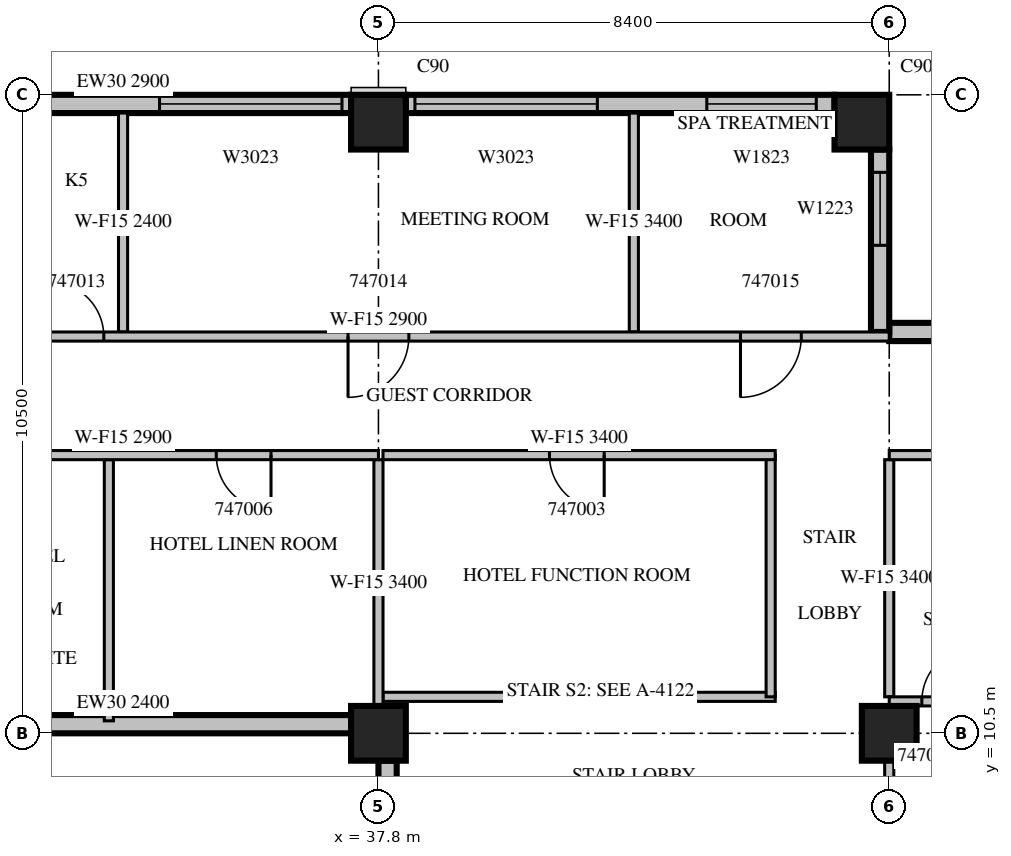
"""IFC4 building model, lengths in metres.
Left out: names, types, materials, properties, quantities, classifications, styles, units other than length and angle.
Written with IfcOpenShell. Run it as: python <this file> out.ifc"""

import sys

from ifc_helpers import new_model, si_unit, direction, frame, frame_2d, origin, origin_2d, place, context, subcontext, project, spatial, rectangle, extrude, source, transform, mapped, element, fill, save


model = new_model("IFC4")
c1 = context("Model", 3, precision=1e-05, world=origin(), true_north=direction((0.0, 1.0)))
c2 = subcontext(c1, "Body", "Model", "MODEL_VIEW")
j1 = project(units=[si_unit("LENGTHUNIT", "METRE"), si_unit("PLANEANGLEUNIT", "RADIAN")], contexts=[c1])
p1 = place(None, origin())
s1 = spatial("IfcSite", under=j1, at=p1, CompositionType="ELEMENT")
p2 = place(p1, origin())
s2 = spatial("IfcBuilding", under=s1, at=p2, CompositionType="ELEMENT")
p3 = place(p2, frame((0.0, 0.0, 212.0)))
s3 = spatial("IfcBuildingStorey", under=s2, at=p3, CompositionType="ELEMENT", Elevation=212.0)
m1 = source(origin(), c2, "Body", "SweptSolid", [
    extrude(rectangle(XDim=0.9, YDim=0.9, at=origin_2d()), origin(), (0.0, 0.0, 1.0), 3.8),
])
for number, where, z_axis, x_axis in (
    (1, (37.8, 10.5, 0.0), (0.0, 0.0, 1.0), (1.0, 0.0, 0.0)),
    (2, (46.2, 10.5, 0.0), (0.0, 0.0, 1.0), (1.0, 0.0, 0.0)),
    (3, (37.8, 20.55, 0.0), (0.0, 0.0, 1.0), (1.0, 0.0, 0.0)),
    (4, (45.75, 20.55, 0.0), (0.0, 0.0, 1.0), (1.0, 0.0, 0.0)),
):
    element("IfcColumn", number, at=place(p3, frame(where, z_axis=z_axis, x_axis=x_axis)), inside=s3, PredefinedType="COLUMN", context=c2, shape_type="MappedRepresentation", body=[
        mapped(m1, transform((0.0, 0.0, 0.0), scale=1.0)),
    ])
m2 = source(origin(), c2, "Body", "SweptSolid", [
    extrude(rectangle(XDim=7.5, YDim=0.3, at=frame_2d((3.75, 0.0))), origin(), (0.0, 0.0, 1.0), 2.4),
])
p4 = place(p3, frame((29.85, 10.65, 0.0), z_axis=(0.0, 0.0, 1.0), x_axis=(1.0, 0.0, 0.0)))
e5 = element("IfcWall", 5, at=p4, inside=s3, PredefinedType="STANDARD", context=c2, shape_type="MappedRepresentation", body=[
    mapped(m2, transform((0.0, 0.0, 0.0), scale=1.0)),
])
m3 = source(origin(), c2, "Body", "SweptSolid", [
    extrude(rectangle(XDim=9.15, YDim=0.3, at=frame_2d((4.575, 0.0))), origin(), (0.0, 0.0, 1.0), 3.4),
])
p5 = place(p3, frame((37.95, 10.05, 0.0), z_axis=(0.0, 0.0, 1.0), x_axis=(0.0, -1.0, 0.0)))
e6 = element("IfcWall", 6, at=p5, inside=s3, PredefinedType="STANDARD", context=c2, shape_type="MappedRepresentation", body=[
    mapped(m3, transform((0.0, 0.0, 0.0), scale=1.0)),
])
m4 = source(origin(), c2, "Body", "SweptSolid", [
    extrude(rectangle(XDim=1.8, YDim=2.3, at=frame_2d((0.9, 1.15))), frame((0.0, 0.16, 0.0), z_axis=(0.0, -1.0, 0.0), x_axis=(1.0, 0.0, 0.0)), (0.0, 0.0, 1.0), 0.32),
])
p6 = place(p5, frame((1.962, 0.0, 0.6)))
e7 = element("IfcOpeningElement", 7, at=p6, cuts=e6, PredefinedType="OPENING", context=c2, shape_type="MappedRepresentation", body=[
    mapped(m4, transform((0.0, 0.0, 0.0), scale=1.0)),
])
m5 = source(origin(), c2, "Body", "SweptSolid", [
    extrude(rectangle(XDim=3.0, YDim=2.3, at=frame_2d((1.5, 1.15))), frame((0.0, 0.16, 0.0), z_axis=(0.0, -1.0, 0.0), x_axis=(1.0, 0.0, 0.0)), (0.0, 0.0, 1.0), 0.32),
])
p7 = place(p5, frame((5.925, 0.0, 0.6)))
e8 = element("IfcOpeningElement", 8, at=p7, cuts=e6, PredefinedType="OPENING", context=c2, shape_type="MappedRepresentation", body=[
    mapped(m5, transform((0.0, 0.0, 0.0), scale=1.0)),
])
m6 = source(origin(), c2, "Body", "SweptSolid", [
    extrude(rectangle(XDim=7.56, YDim=0.3, at=frame_2d((3.78, 0.0))), origin(), (0.0, 0.0, 1.0), 3.4),
])
p8 = place(p3, frame((53.76, 17.1, 0.0), z_axis=(0.0, 0.0, 1.0), x_axis=(-1.0, 0.0, 0.0)))
e9 = element("IfcWall", 9, at=p8, inside=s3, PredefinedType="STANDARD", context=c2, shape_type="MappedRepresentation", body=[
    mapped(m6, transform((0.0, 0.0, 0.0), scale=1.0)),
])
m7 = source(origin(), c2, "Body", "SweptSolid", [
    extrude(rectangle(XDim=3.6, YDim=2.3, at=frame_2d((1.8, 1.15))), frame((0.0, 0.16, 0.0), z_axis=(0.0, -1.0, 0.0), x_axis=(1.0, 0.0, 0.0)), (0.0, 0.0, 1.0), 0.32),
])
p9 = place(p8, frame((1.14, 0.0, 0.6)))
e10 = element("IfcOpeningElement", 10, at=p9, cuts=e9, PredefinedType="OPENING", context=c2, shape_type="MappedRepresentation", body=[
    mapped(m7, transform((0.0, 0.0, 0.0), scale=1.0)),
])
m8 = source(origin(), c2, "Body", "SweptSolid", [
    extrude(rectangle(XDim=3.0, YDim=0.3, at=frame_2d((1.5, 0.0))), origin(), (0.0, 0.0, 1.0), 3.4),
])
p10 = place(p3, frame((46.05, 17.1, 0.0), z_axis=(0.0, 0.0, 1.0), x_axis=(0.0, 1.0, 0.0)))
e11 = element("IfcWall", 11, at=p10, inside=s3, PredefinedType="STANDARD", context=c2, shape_type="MappedRepresentation", body=[
    mapped(m8, transform((0.0, 0.0, 0.0), scale=1.0)),
])
m9 = source(origin(), c2, "Body", "SweptSolid", [
    extrude(rectangle(XDim=1.2, YDim=2.3, at=frame_2d((0.6, 1.15))), frame((0.0, 0.16, 0.0), z_axis=(0.0, -1.0, 0.0), x_axis=(1.0, 0.0, 0.0)), (0.0, 0.0, 1.0), 0.32),
])
p11 = place(p10, frame((1.425, 0.0, 0.6)))
e12 = element("IfcOpeningElement", 12, at=p11, cuts=e11, PredefinedType="OPENING", context=c2, shape_type="MappedRepresentation", body=[
    mapped(m9, transform((0.0, 0.0, 0.0), scale=1.0)),
])
m10 = source(origin(), c2, "Body", "SweptSolid", [
    extrude(rectangle(XDim=7.05, YDim=0.3, at=frame_2d((3.525, 0.0))), origin(), (0.0, 0.0, 1.0), 3.4),
])
p12 = place(p3, frame((45.3, 20.85, 0.0), z_axis=(0.0, 0.0, 1.0), x_axis=(-1.0, 0.0, 0.0)))
e13 = element("IfcWall", 13, at=p12, inside=s3, PredefinedType="STANDARD", context=c2, shape_type="MappedRepresentation", body=[
    mapped(m10, transform((0.0, 0.0, 0.0), scale=1.0)),
])
p13 = place(p12, frame((0.3, 0.0, 0.6)))
e14 = element("IfcOpeningElement", 14, at=p13, cuts=e13, PredefinedType="OPENING", context=c2, shape_type="MappedRepresentation", body=[
    mapped(m4, transform((0.0, 0.0, 0.0), scale=1.0)),
])
p14 = place(p12, frame((3.9, 0.0, 0.6)))
e15 = element("IfcOpeningElement", 15, at=p14, cuts=e13, PredefinedType="OPENING", context=c2, shape_type="MappedRepresentation", body=[
    mapped(m5, transform((0.0, 0.0, 0.0), scale=1.0)),
])
m11 = source(origin(), c2, "Body", "SweptSolid", [
    extrude(rectangle(XDim=7.5, YDim=0.3, at=frame_2d((3.75, 0.0))), origin(), (0.0, 0.0, 1.0), 2.9),
])
p15 = place(p3, frame((37.35, 20.85, 0.0), z_axis=(0.0, 0.0, 1.0), x_axis=(-1.0, 0.0, 0.0)))
e16 = element("IfcWall", 16, at=p15, inside=s3, PredefinedType="STANDARD", context=c2, shape_type="MappedRepresentation", body=[
    mapped(m11, transform((0.0, 0.0, 0.0), scale=1.0)),
])
p16 = place(p15, frame((0.15, 0.0, 0.6)))
e17 = element("IfcOpeningElement", 17, at=p16, cuts=e16, PredefinedType="OPENING", context=c2, shape_type="MappedRepresentation", body=[
    mapped(m5, transform((0.0, 0.0, 0.0), scale=1.0)),
])
p17 = place(p15, frame((5.804, 0.0, 0.6)))
e18 = element("IfcOpeningElement", 18, at=p17, cuts=e16, PredefinedType="OPENING", context=c2, shape_type="MappedRepresentation", body=[
    mapped(m9, transform((0.0, 0.0, 0.0), scale=1.0)),
])
m12 = source(origin(), c2, "Body", "SweptSolid", [
    extrude(rectangle(XDim=6.45, YDim=0.15, at=frame_2d((3.225, 0.0))), origin(), (0.0, 0.0, 1.0), 3.4),
])
p18 = place(p3, frame((37.875, 11.1, 0.0), z_axis=(0.0, 0.0, 1.0), x_axis=(1.0, 0.0, 0.0)))
e19 = element("IfcWall", 19, at=p18, inside=s3, PredefinedType="PARTITIONING", context=c2, shape_type="MappedRepresentation", body=[
    mapped(m12, transform((0.0, 0.0, 0.0), scale=1.0)),
])
m13 = source(origin(), c2, "Body", "SweptSolid", [
    extrude(rectangle(XDim=3.975, YDim=0.15, at=frame_2d((1.988, 0.0))), origin(), (0.0, 0.0, 1.0), 3.4),
])
p19 = place(p3, frame((44.25, 11.1, 0.0), z_axis=(0.0, 0.0, 1.0), x_axis=(0.0, 1.0, 0.0)))
e20 = element("IfcWall", 20, at=p19, inside=s3, PredefinedType="PARTITIONING", context=c2, shape_type="MappedRepresentation", body=[
    mapped(m13, transform((0.0, 0.0, 0.0), scale=1.0)),
])
p20 = place(p3, frame((44.325, 15.075, 0.0), z_axis=(0.0, 0.0, 1.0), x_axis=(-1.0, 0.0, 0.0)))
e21 = element("IfcWall", 21, at=p20, inside=s3, PredefinedType="PARTITIONING", context=c2, shape_type="MappedRepresentation", body=[
    mapped(m12, transform((0.0, 0.0, 0.0), scale=1.0)),
])
m14 = source(origin(), c2, "Body", "SweptSolid", [
    extrude(rectangle(XDim=0.9, YDim=2.1, at=frame_2d((0.45, 1.05))), frame((0.0, 0.085, 0.0), z_axis=(0.0, -1.0, 0.0), x_axis=(1.0, 0.0, 0.0)), (0.0, 0.0, 1.0), 0.17),
])
p21 = place(p20, frame((2.812, 0.0, 0.0)))
e22 = element("IfcOpeningElement", 22, at=p21, cuts=e21, PredefinedType="OPENING", context=c2, shape_type="MappedRepresentation", body=[
    mapped(m14, transform((0.0, 0.0, 0.0), scale=1.0)),
])
m15 = source(origin(), c2, "Body", "SweptSolid", [
    extrude(rectangle(XDim=4.295, YDim=0.15, at=frame_2d((2.147, 0.0))), origin(), (0.0, 0.0, 1.0), 3.4),
])
p22 = place(p3, frame((33.367, 10.705, 0.0), z_axis=(0.0, 0.0, 1.0), x_axis=(0.0, 1.0, 0.0)))
e23 = element("IfcWall", 23, at=p22, inside=s3, PredefinedType="PARTITIONING", context=c2, shape_type="MappedRepresentation", body=[
    mapped(m15, transform((0.0, 0.0, 0.0), scale=1.0)),
])
m16 = source(origin(), c2, "Body", "SweptSolid", [
    extrude(rectangle(XDim=4.051, YDim=0.15, at=frame_2d((2.026, 0.0))), origin(), (0.0, 0.0, 1.0), 3.4),
])
p23 = place(p3, frame((37.8, 10.949, 0.0), z_axis=(0.0, 0.0, 1.0), x_axis=(0.0, 1.0, 0.0)))
e24 = element("IfcWall", 24, at=p23, inside=s3, PredefinedType="PARTITIONING", context=c2, shape_type="MappedRepresentation", body=[
    mapped(m16, transform((0.0, 0.0, 0.0), scale=1.0)),
])
m17 = source(origin(), c2, "Body", "SweptSolid", [
    extrude(rectangle(XDim=9.152, YDim=0.15, at=frame_2d((4.576, 0.0))), origin(), (0.0, 0.0, 1.0), 3.4),
])
p24 = place(p3, frame((46.2, 0.899, 0.0), z_axis=(0.0, 0.0, 1.0), x_axis=(0.0, 1.0, 0.0)))
e25 = element("IfcWall", 25, at=p24, inside=s3, PredefinedType="PARTITIONING", context=c2, shape_type="MappedRepresentation", body=[
    mapped(m17, transform((0.0, 0.0, 0.0), scale=1.0)),
])
m18 = source(origin(), c2, "Body", "SweptSolid", [
    extrude(rectangle(XDim=3.9, YDim=0.15, at=frame_2d((1.95, 0.0))), origin(), (0.0, 0.0, 1.0), 3.4),
])
p25 = place(p3, frame((46.2, 11.1, 0.0), z_axis=(0.0, 0.0, 1.0), x_axis=(0.0, 1.0, 0.0)))
e26 = element("IfcWall", 26, at=p25, inside=s3, PredefinedType="PARTITIONING", context=c2, shape_type="MappedRepresentation", body=[
    mapped(m18, transform((0.0, 0.0, 0.0), scale=1.0)),
])
m19 = source(origin(), c2, "Body", "SweptSolid", [
    extrude(rectangle(XDim=7.355, YDim=0.15, at=frame_2d((3.678, 0.0))), origin(), (0.0, 0.0, 1.0), 3.4),
])
p26 = place(p3, frame((53.555, 11.025, 0.0), z_axis=(0.0, 0.0, 1.0), x_axis=(-1.0, 0.0, 0.0)))
e27 = element("IfcWall", 27, at=p26, inside=s3, PredefinedType="PARTITIONING", context=c2, shape_type="MappedRepresentation", body=[
    mapped(m19, transform((0.0, 0.0, 0.0), scale=1.0)),
])
m20 = source(origin(), c2, "Body", "SweptSolid", [
    extrude(rectangle(XDim=1.0, YDim=2.1, at=frame_2d((0.5, 1.05))), frame((0.0, 0.085, 0.0), z_axis=(0.0, -1.0, 0.0), x_axis=(1.0, 0.0, 0.0)), (0.0, 0.0, 1.0), 0.17),
])
p27 = place(p26, frame((4.869, 0.0, 0.0)))
e28 = element("IfcOpeningElement", 28, at=p27, cuts=e27, PredefinedType="OPENING", context=c2, shape_type="MappedRepresentation", body=[
    mapped(m20, transform((0.0, 0.0, 0.0), scale=1.0)),
])
p28 = place(p26, frame((5.919, 0.0, 0.0)))
e29 = element("IfcOpeningElement", 29, at=p28, cuts=e27, PredefinedType="OPENING", context=c2, shape_type="MappedRepresentation", body=[
    mapped(m14, transform((0.0, 0.0, 0.0), scale=1.0)),
])
m21 = source(origin(), c2, "Body", "SweptSolid", [
    extrude(rectangle(XDim=3.6, YDim=0.15, at=frame_2d((1.8, 0.0))), origin(), (0.0, 0.0, 1.0), 2.4),
])
p29 = place(p3, frame((33.6, 17.1, 0.0), z_axis=(0.0, 0.0, 1.0), x_axis=(0.0, 1.0, 0.0)))
e30 = element("IfcWall", 30, at=p29, inside=s3, PredefinedType="PARTITIONING", context=c2, shape_type="MappedRepresentation", body=[
    mapped(m21, transform((0.0, 0.0, 0.0), scale=1.0)),
])
m22 = source(origin(), c2, "Body", "SweptSolid", [
    extrude(rectangle(XDim=3.6, YDim=0.15, at=frame_2d((1.8, 0.0))), origin(), (0.0, 0.0, 1.0), 3.4),
])
p30 = place(p3, frame((42.0, 17.1, 0.0), z_axis=(0.0, 0.0, 1.0), x_axis=(0.0, 1.0, 0.0)))
e31 = element("IfcWall", 31, at=p30, inside=s3, PredefinedType="PARTITIONING", context=c2, shape_type="MappedRepresentation", body=[
    mapped(m22, transform((0.0, 0.0, 0.0), scale=1.0)),
])
m23 = source(origin(), c2, "Body", "SweptSolid", [
    extrude(rectangle(XDim=8.4, YDim=0.15, at=frame_2d((4.2, 0.0))), origin(), (0.0, 0.0, 1.0), 2.9),
])
p31 = place(p3, frame((37.8, 15.075, 0.0), z_axis=(0.0, 0.0, 1.0), x_axis=(-1.0, 0.0, 0.0)))
e32 = element("IfcWall", 32, at=p31, inside=s3, PredefinedType="PARTITIONING", context=c2, shape_type="MappedRepresentation", body=[
    mapped(m23, transform((0.0, 0.0, 0.0), scale=1.0)),
])
p32 = place(p31, frame((7.155, 0.0, 0.0)))
e33 = element("IfcOpeningElement", 33, at=p32, cuts=e32, PredefinedType="OPENING", context=c2, shape_type="MappedRepresentation", body=[
    mapped(m20, transform((0.0, 0.0, 0.0), scale=1.0)),
])
p33 = place(p31, frame((1.767, 0.0, 0.0)))
e34 = element("IfcOpeningElement", 34, at=p33, cuts=e32, PredefinedType="OPENING", context=c2, shape_type="MappedRepresentation", body=[
    mapped(m14, transform((0.0, 0.0, 0.0), scale=1.0)),
])
p34 = place(p3, frame((53.555, 15.075, 0.0), z_axis=(0.0, 0.0, 1.0), x_axis=(-1.0, 0.0, 0.0)))
e35 = element("IfcWall", 35, at=p34, inside=s3, PredefinedType="PARTITIONING", context=c2, shape_type="MappedRepresentation", body=[
    mapped(m19, transform((0.0, 0.0, 0.0), scale=1.0)),
])
m24 = source(origin(), c2, "Body", "SweptSolid", [
    extrude(rectangle(XDim=1.2, YDim=2.1, at=frame_2d((0.6, 1.05))), frame((0.0, 0.085, 0.0), z_axis=(0.0, -1.0, 0.0), x_axis=(1.0, 0.0, 0.0)), (0.0, 0.0, 1.0), 0.17),
])
p35 = place(p34, frame((5.006, 0.0, 0.0)))
e36 = element("IfcOpeningElement", 36, at=p35, cuts=e35, PredefinedType="OPENING", context=c2, shape_type="MappedRepresentation", body=[
    mapped(m24, transform((0.0, 0.0, 0.0), scale=1.0)),
])
p36 = place(p34, frame((2.124, 0.0, 0.0)))
e37 = element("IfcOpeningElement", 37, at=p36, cuts=e35, PredefinedType="OPENING", context=c2, shape_type="MappedRepresentation", body=[
    mapped(m14, transform((0.0, 0.0, 0.0), scale=1.0)),
])
p37 = place(p3, frame((29.4, 17.025, 0.0), z_axis=(0.0, 0.0, 1.0), x_axis=(1.0, 0.0, 0.0)))
e38 = element("IfcWall", 38, at=p37, inside=s3, PredefinedType="PARTITIONING", context=c2, shape_type="SweptSolid", body=[
    extrude(rectangle(XDim=16.8, YDim=0.15, at=frame_2d((8.4, 0.0))), origin(), (0.0, 0.0, 1.0), 2.9),
])
p38 = place(p37, frame((0.883, 0.0, 0.0)))
e39 = element("IfcOpeningElement", 39, at=p38, cuts=e38, PredefinedType="OPENING", context=c2, shape_type="MappedRepresentation", body=[
    mapped(m14, transform((0.0, 0.0, 0.0), scale=1.0)),
])
p39 = place(p37, frame((2.983, 0.0, 0.0)))
e40 = element("IfcOpeningElement", 40, at=p39, cuts=e38, PredefinedType="OPENING", context=c2, shape_type="MappedRepresentation", body=[
    mapped(m14, transform((0.0, 0.0, 0.0), scale=1.0)),
])
p40 = place(p37, frame((7.9, 0.0, 0.0)))
e41 = element("IfcOpeningElement", 41, at=p40, cuts=e38, PredefinedType="OPENING", context=c2, shape_type="MappedRepresentation", body=[
    mapped(m20, transform((0.0, 0.0, 0.0), scale=1.0)),
])
p41 = place(p37, frame((14.354, 0.0, 0.0)))
e42 = element("IfcOpeningElement", 42, at=p41, cuts=e38, PredefinedType="OPENING", context=c2, shape_type="MappedRepresentation", body=[
    mapped(m20, transform((0.0, 0.0, 0.0), scale=1.0)),
])
m25 = source(origin(), c2, "Body", "SweptSolid", [
    extrude(rectangle(XDim=1.2, YDim=2.3, at=frame_2d((0.6, 1.15))), frame((0.0, 0.03, 0.0), z_axis=(0.0, -1.0, 0.0), x_axis=(1.0, 0.0, 0.0)), (0.0, 0.0, 1.0), 0.06),
])
p42 = place(p11, origin())
e43 = element("IfcWindow", 43, at=p42, inside=s3, PartitioningType="SINGLE_PANEL", PredefinedType="WINDOW", context=c2, shape_type="MappedRepresentation", body=[
    mapped(m25, transform((0.0, 0.0, 0.0), scale=1.0)),
])
fill(e12, e43)
m26 = source(origin(), c2, "Body", "SweptSolid", [
    extrude(rectangle(XDim=1.8, YDim=2.3, at=frame_2d((0.9, 1.15))), frame((0.0, 0.03, 0.0), z_axis=(0.0, -1.0, 0.0), x_axis=(1.0, 0.0, 0.0)), (0.0, 0.0, 1.0), 0.06),
])
p43 = place(p13, origin())
e44 = element("IfcWindow", 44, at=p43, inside=s3, PartitioningType="SINGLE_PANEL", PredefinedType="WINDOW", context=c2, shape_type="MappedRepresentation", body=[
    mapped(m26, transform((0.0, 0.0, 0.0), scale=1.0)),
])
fill(e14, e44)
m27 = source(origin(), c2, "Body", "SweptSolid", [
    extrude(rectangle(XDim=3.0, YDim=2.3, at=frame_2d((1.5, 1.15))), frame((0.0, 0.03, 0.0), z_axis=(0.0, -1.0, 0.0), x_axis=(1.0, 0.0, 0.0)), (0.0, 0.0, 1.0), 0.06),
])
p44 = place(p14, origin())
e45 = element("IfcWindow", 45, at=p44, inside=s3, PartitioningType="SINGLE_PANEL", PredefinedType="WINDOW", context=c2, shape_type="MappedRepresentation", body=[
    mapped(m27, transform((0.0, 0.0, 0.0), scale=1.0)),
])
fill(e15, e45)
p45 = place(p16, origin())
e46 = element("IfcWindow", 46, at=p45, inside=s3, PartitioningType="SINGLE_PANEL", PredefinedType="WINDOW", context=c2, shape_type="MappedRepresentation", body=[
    mapped(m27, transform((0.0, 0.0, 0.0), scale=1.0)),
])
fill(e17, e46)
m28 = source(origin(), c2, "Body", "SweptSolid", [
    extrude(rectangle(XDim=0.9, YDim=2.1, at=frame_2d((0.45, 1.05))), frame((0.0, 0.025, 0.0), z_axis=(0.0, -1.0, 0.0), x_axis=(1.0, 0.0, 0.0)), (0.0, 0.0, 1.0), 0.05),
])
p46 = place(p21, origin())
e47 = element("IfcDoor", 47, at=p46, inside=s3, OperationType="SINGLE_SWING_LEFT", PredefinedType="DOOR", context=c2, shape_type="MappedRepresentation", body=[
    mapped(m28, transform((0.0, 0.0, 0.0), scale=1.0)),
])
fill(e22, e47)
p47 = place(p33, origin())
e48 = element("IfcDoor", 48, at=p47, inside=s3, OperationType="SINGLE_SWING_LEFT", PredefinedType="DOOR", context=c2, shape_type="MappedRepresentation", body=[
    mapped(m28, transform((0.0, 0.0, 0.0), scale=1.0)),
])
fill(e34, e48)
p48 = place(p28, origin())
e49 = element("IfcDoor", 49, at=p48, inside=s3, OperationType="SINGLE_SWING_RIGHT", PredefinedType="DOOR", context=c2, shape_type="MappedRepresentation", body=[
    mapped(m28, transform((0.0, 0.0, 0.0), scale=1.0)),
])
fill(e29, e49)
p49 = place(p39, origin())
e50 = element("IfcDoor", 50, at=p49, inside=s3, OperationType="SINGLE_SWING_LEFT", PredefinedType="DOOR", context=c2, shape_type="MappedRepresentation", body=[
    mapped(m28, transform((0.0, 0.0, 0.0), scale=1.0)),
])
fill(e40, e50)
m29 = source(origin(), c2, "Body", "SweptSolid", [
    extrude(rectangle(XDim=1.0, YDim=2.1, at=frame_2d((0.5, 1.05))), frame((0.0, 0.025, 0.0), z_axis=(0.0, -1.0, 0.0), x_axis=(1.0, 0.0, 0.0)), (0.0, 0.0, 1.0), 0.05),
])
p50 = place(p40, origin())
e51 = element("IfcDoor", 51, at=p50, inside=s3, OperationType="SINGLE_SWING_RIGHT", PredefinedType="DOOR", context=c2, shape_type="MappedRepresentation", body=[
    mapped(m29, transform((0.0, 0.0, 0.0), scale=1.0)),
])
fill(e41, e51)
p51 = place(p41, origin())
e52 = element("IfcDoor", 52, at=p51, inside=s3, OperationType="SINGLE_SWING_RIGHT", PredefinedType="DOOR", context=c2, shape_type="MappedRepresentation", body=[
    mapped(m29, transform((0.0, 0.0, 0.0), scale=1.0)),
])
fill(e42, e52)
save(model, sys.argv[1])
